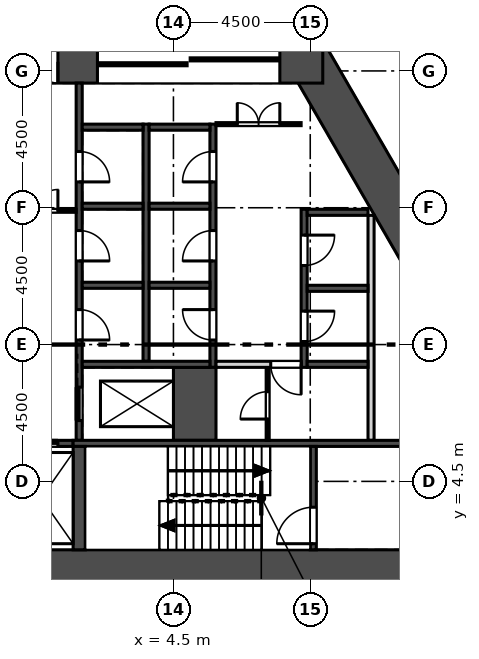
"""IFC4 building model, lengths in metres.
Left out: names, types, materials, properties, quantities, classifications, styles, units other than length and angle.
Written with IfcOpenShell. Run it as: python <this file> out.ifc"""

import sys

from ifc_helpers import new_model, si_unit, direction, frame, frame_2d, origin, place, context, subcontext, project, spatial, rectangle, extrude, element, fill, save


model = new_model("IFC4")
c1 = context("Model", 3, precision=1e-05, world=origin(), true_north=direction((0.0, 1.0)))
c2 = subcontext(c1, "Body", "Model", "MODEL_VIEW")
j1 = project(units=[si_unit("LENGTHUNIT", "METRE"), si_unit("PLANEANGLEUNIT", "RADIAN")], contexts=[c1])
p1 = place(None, origin())
s1 = spatial("IfcSite", under=j1, at=p1, CompositionType="ELEMENT")
p2 = place(p1, origin())
s2 = spatial("IfcBuilding", under=s1, at=p2, CompositionType="ELEMENT")
p3 = place(p2, frame((0.0, 0.0, -8.0)))
s3 = spatial("IfcBuildingStorey", under=s2, at=p3, CompositionType="ELEMENT", Elevation=-8.0)
p4 = place(p3, frame((42.971, 8.51, 0.0), z_axis=(0.0, 0.0, 1.0), x_axis=(-0.499999312333, 0.866025800809, 0.0)))
e1 = element("IfcWall", 1, at=p4, inside=s3, PredefinedType="SOLIDWALL", context=c2, shape_type="SweptSolid", body=[
    extrude(rectangle(XDim=76.231, YDim=0.6, at=frame_2d((38.115, 0.0))), origin(), (0.0, 0.0, 1.0), 7.6),
])
p5 = place(p3, frame((-14.0, 1.55, 0.0), z_axis=(0.0, 0.0, 1.0), x_axis=(1.0, 0.0, 0.0)))
e2 = element("IfcWall", 2, at=p5, inside=s3, PredefinedType="SHEAR", context=c2, shape_type="SweptSolid", body=[
    extrude(rectangle(XDim=28.0, YDim=1.4, at=frame_2d((14.0, 0.0))), origin(), (0.0, 0.0, 1.0), 8.0),
])
p6 = place(p3, frame((13.394, 10.703, 0.0), z_axis=(0.0, 0.0, 1.0), x_axis=(-0.50000187635, 0.866024320471, 0.0)))
e3 = element("IfcWall", 3, at=p6, inside=s3, PredefinedType="SHEAR", context=c2, shape_type="SweptSolid", body=[
    extrude(rectangle(XDim=9.177, YDim=1.4, at=frame_2d((4.588, 0.0))), origin(), (0.0, 0.0, 1.0), 8.0),
])
p7 = place(p3, frame((9.412, 18.3, 0.0), z_axis=(0.0, 0.0, 1.0), x_axis=(-1.0, 0.0, 0.0)))
e4 = element("IfcWall", 4, at=p7, inside=s3, PredefinedType="SHEAR", context=c2, shape_type="SweptSolid", body=[
    extrude(rectangle(XDim=18.823, YDim=1.4, at=frame_2d((9.412, 0.0))), origin(), (0.0, 0.0, 1.0), 8.0),
])
p8 = place(p7, frame((8.711, 0.0, 0.0)))
e5 = element("IfcOpeningElement", 5, at=p8, cuts=e4, PredefinedType="OPENING", context=c2, shape_type="SweptSolid", body=[
    extrude(rectangle(XDim=1.4, YDim=2.1, at=frame_2d((0.7, 1.05))), frame((0.0, 0.71, 0.0), z_axis=(0.0, -1.0, 0.0), x_axis=(1.0, 0.0, 0.0)), (0.0, 0.0, 1.0), 1.42),
])
p9 = place(p7, frame((11.412, 0.0, 0.0)))
e6 = element("IfcOpeningElement", 6, at=p9, cuts=e4, PredefinedType="OPENING", context=c2, shape_type="SweptSolid", body=[
    extrude(rectangle(XDim=6.0, YDim=2.4, at=frame_2d((3.0, 1.2))), frame((0.0, 0.71, 0.0), z_axis=(0.0, -1.0, 0.0), x_axis=(1.0, 0.0, 0.0)), (0.0, 0.0, 1.0), 1.42),
])
p10 = place(p7, frame((1.412, 0.0, 0.0)))
e7 = element("IfcOpeningElement", 7, at=p10, cuts=e4, PredefinedType="OPENING", context=c2, shape_type="SweptSolid", body=[
    extrude(rectangle(XDim=6.0, YDim=2.4, at=frame_2d((3.0, 1.2))), frame((0.0, 0.71, 0.0), z_axis=(0.0, -1.0, 0.0), x_axis=(1.0, 0.0, 0.0)), (0.0, 0.0, 1.0), 1.42),
])
p11 = place(p3, frame((11.0, 5.85, 0.0), z_axis=(0.0, 0.0, 1.0), x_axis=(0.0, 1.0, 0.0)))
e8 = element("IfcWall", 8, at=p11, inside=s3, PredefinedType="SOLIDWALL", context=c2, shape_type="SweptSolid", body=[
    extrude(rectangle(XDim=7.4, YDim=0.2, at=frame_2d((3.7, 0.0))), origin(), (0.0, 0.0, 1.0), 7.6),
])
p12 = place(p3, frame((8.8, 8.25, -0.35), z_axis=(0.0, 0.0, 1.0), x_axis=(0.0, 1.0, 0.0)))
e9 = element("IfcWall", 9, at=p12, inside=s3, PredefinedType="SOLIDWALL", context=c2, shape_type="SweptSolid", body=[
    extrude(rectangle(XDim=5.2, YDim=0.2, at=frame_2d((2.6, 0.0))), origin(), (0.0, 0.0, 1.0), 7.95),
])
p13 = place(p12, frame((0.85, 0.0, 0.35)))
e10 = element("IfcOpeningElement", 10, at=p13, cuts=e9, PredefinedType="OPENING", context=c2, shape_type="SweptSolid", body=[
    extrude(rectangle(XDim=1.0, YDim=2.1, at=frame_2d((0.5, 1.05))), frame((0.0, 0.11, 0.0), z_axis=(0.0, -1.0, 0.0), x_axis=(1.0, 0.0, 0.0)), (0.0, 0.0, 1.0), 0.22),
])
p14 = place(p12, frame((3.35, 0.0, 0.35)))
e11 = element("IfcOpeningElement", 11, at=p14, cuts=e9, PredefinedType="OPENING", context=c2, shape_type="SweptSolid", body=[
    extrude(rectangle(XDim=1.0, YDim=2.1, at=frame_2d((0.5, 1.05))), frame((0.0, 0.11, 0.0), z_axis=(0.0, -1.0, 0.0), x_axis=(1.0, 0.0, 0.0)), (0.0, 0.0, 1.0), 0.22),
])
p15 = place(p3, frame((5.8, 8.25, -0.35), z_axis=(0.0, 0.0, 1.0), x_axis=(0.0, 1.0, 0.0)))
e12 = element("IfcWall", 12, at=p15, inside=s3, PredefinedType="SOLIDWALL", context=c2, shape_type="SweptSolid", body=[
    extrude(rectangle(XDim=8.0, YDim=0.2, at=frame_2d((4.0, 0.0))), origin(), (0.0, 0.0, 1.0), 7.95),
])
p16 = place(p15, frame((0.9, 0.0, 0.35)))
e13 = element("IfcOpeningElement", 13, at=p16, cuts=e12, PredefinedType="OPENING", context=c2, shape_type="SweptSolid", body=[
    extrude(rectangle(XDim=1.0, YDim=2.1, at=frame_2d((0.5, 1.05))), frame((0.0, 0.11, 0.0), z_axis=(0.0, -1.0, 0.0), x_axis=(1.0, 0.0, 0.0)), (0.0, 0.0, 1.0), 0.22),
])
p17 = place(p15, frame((3.5, 0.0, 0.35)))
e14 = element("IfcOpeningElement", 14, at=p17, cuts=e12, PredefinedType="OPENING", context=c2, shape_type="SweptSolid", body=[
    extrude(rectangle(XDim=1.0, YDim=2.1, at=frame_2d((0.5, 1.05))), frame((0.0, 0.11, 0.0), z_axis=(0.0, -1.0, 0.0), x_axis=(1.0, 0.0, 0.0)), (0.0, 0.0, 1.0), 0.22),
])
p18 = place(p15, frame((6.1, 0.0, 0.35)))
e15 = element("IfcOpeningElement", 15, at=p18, cuts=e12, PredefinedType="OPENING", context=c2, shape_type="SweptSolid", body=[
    extrude(rectangle(XDim=1.0, YDim=2.1, at=frame_2d((0.5, 1.05))), frame((0.0, 0.11, 0.0), z_axis=(0.0, -1.0, 0.0), x_axis=(1.0, 0.0, 0.0)), (0.0, 0.0, 1.0), 0.22),
])
p19 = place(p3, frame((3.6, 8.45, -0.35), z_axis=(0.0, 0.0, 1.0), x_axis=(0.0, 1.0, 0.0)))
e16 = element("IfcWall", 16, at=p19, inside=s3, PredefinedType="SOLIDWALL", context=c2, shape_type="SweptSolid", body=[
    extrude(rectangle(XDim=7.8, YDim=0.2, at=frame_2d((3.9, 0.0))), origin(), (0.0, 0.0, 1.0), 7.95),
])
p20 = place(p3, frame((1.4, 5.85, -0.35), z_axis=(0.0, 0.0, 1.0), x_axis=(0.0, 1.0, 0.0)))
e17 = element("IfcWall", 17, at=p20, inside=s3, PredefinedType="SOLIDWALL", context=c2, shape_type="SweptSolid", body=[
    extrude(rectangle(XDim=11.75, YDim=0.2, at=frame_2d((5.875, 0.0))), origin(), (0.0, 0.0, 1.0), 7.95),
])
p21 = place(p20, frame((0.65, 0.0, 0.35)))
e18 = element("IfcOpeningElement", 18, at=p21, cuts=e17, PredefinedType="OPENING", context=c2, shape_type="SweptSolid", body=[
    extrude(rectangle(XDim=1.1, YDim=2.1, at=frame_2d((0.55, 1.05))), frame((0.0, 0.11, 0.0), z_axis=(0.0, -1.0, 0.0), x_axis=(1.0, 0.0, 0.0)), (0.0, 0.0, 1.0), 0.22),
])
p22 = place(p20, frame((3.3, 0.0, 0.35)))
e19 = element("IfcOpeningElement", 19, at=p22, cuts=e17, PredefinedType="OPENING", context=c2, shape_type="SweptSolid", body=[
    extrude(rectangle(XDim=1.0, YDim=2.1, at=frame_2d((0.5, 1.05))), frame((0.0, 0.11, 0.0), z_axis=(0.0, -1.0, 0.0), x_axis=(1.0, 0.0, 0.0)), (0.0, 0.0, 1.0), 0.22),
])
p23 = place(p20, frame((5.9, 0.0, 0.35)))
e20 = element("IfcOpeningElement", 20, at=p23, cuts=e17, PredefinedType="OPENING", context=c2, shape_type="SweptSolid", body=[
    extrude(rectangle(XDim=1.0, YDim=2.1, at=frame_2d((0.5, 1.05))), frame((0.0, 0.11, 0.0), z_axis=(0.0, -1.0, 0.0), x_axis=(1.0, 0.0, 0.0)), (0.0, 0.0, 1.0), 0.22),
])
p24 = place(p20, frame((8.5, 0.0, 0.35)))
e21 = element("IfcOpeningElement", 21, at=p24, cuts=e17, PredefinedType="OPENING", context=c2, shape_type="SweptSolid", body=[
    extrude(rectangle(XDim=1.0, YDim=2.1, at=frame_2d((0.5, 1.05))), frame((0.0, 0.11, 0.0), z_axis=(0.0, -1.0, 0.0), x_axis=(1.0, 0.0, 0.0)), (0.0, 0.0, 1.0), 0.22),
])
p25 = place(p3, frame((5.2, 5.85, -0.35), z_axis=(0.0, 0.0, 1.0), x_axis=(0.0, 1.0, 0.0)))
e22 = element("IfcWall", 22, at=p25, inside=s3, PredefinedType="SOLIDWALL", context=c2, shape_type="SweptSolid", body=[
    extrude(rectangle(XDim=2.4, YDim=1.4, at=frame_2d((1.2, 0.0))), origin(), (0.0, 0.0, 1.0), 7.95),
])
p26 = place(p3, frame((8.9, 8.35, -0.35), z_axis=(0.0, 0.0, 1.0), x_axis=(1.0, 0.0, 0.0)))
e23 = element("IfcWall", 23, at=p26, inside=s3, PredefinedType="SOLIDWALL", context=c2, shape_type="SweptSolid", body=[
    extrude(rectangle(XDim=2.0, YDim=0.2, at=frame_2d((1.0, 0.0))), origin(), (0.0, 0.0, 1.0), 7.95),
])
p27 = place(p3, frame((1.5, 8.35, -0.35), z_axis=(0.0, 0.0, 1.0), x_axis=(1.0, 0.0, 0.0)))
e24 = element("IfcWall", 24, at=p27, inside=s3, PredefinedType="SOLIDWALL", context=c2, shape_type="SweptSolid", body=[
    extrude(rectangle(XDim=4.2, YDim=0.2, at=frame_2d((2.1, 0.0))), origin(), (0.0, 0.0, 1.0), 7.95),
])
p28 = place(p3, frame((-1.2, 5.75, -0.35), z_axis=(0.0, 0.0, 1.0), x_axis=(1.0, 0.0, 0.0)))
e25 = element("IfcWall", 25, at=p28, inside=s3, PredefinedType="SOLIDWALL", context=c2, shape_type="SweptSolid", body=[
    extrude(rectangle(XDim=2.4, YDim=0.2, at=frame_2d((1.2, 0.0))), origin(), (0.0, 0.0, 1.0), 7.95),
])
p29 = place(p28, frame((0.5, 0.0, 0.35)))
e26 = element("IfcOpeningElement", 26, at=p29, cuts=e25, PredefinedType="OPENING", context=c2, shape_type="SweptSolid", body=[
    extrude(rectangle(XDim=1.4, YDim=2.1, at=frame_2d((0.7, 1.05))), frame((0.0, 0.11, 0.0), z_axis=(0.0, -1.0, 0.0), x_axis=(1.0, 0.0, 0.0)), (0.0, 0.0, 1.0), 0.22),
])
p30 = place(p3, frame((1.2, 5.75, -0.35), z_axis=(0.0, 0.0, 1.0), x_axis=(1.0, 0.0, 0.0)))
e27 = element("IfcWall", 27, at=p30, inside=s3, PredefinedType="SOLIDWALL", context=c2, shape_type="SweptSolid", body=[
    extrude(rectangle(XDim=11.4, YDim=0.2, at=frame_2d((5.7, 0.0))), origin(), (0.0, 0.0, 1.0), 7.95),
])
p31 = place(p3, frame((9.1, 2.25, -0.35), z_axis=(0.0, 0.0, 1.0), x_axis=(0.0, 1.0, 0.0)))
e28 = element("IfcWall", 28, at=p31, inside=s3, PredefinedType="SOLIDWALL", context=c2, shape_type="SweptSolid", body=[
    extrude(rectangle(XDim=3.4, YDim=0.2, at=frame_2d((1.7, 0.0))), origin(), (0.0, 0.0, 1.0), 7.95),
])
p32 = place(p31, frame((0.2, 0.0, 0.35)))
e29 = element("IfcOpeningElement", 29, at=p32, cuts=e28, PredefinedType="OPENING", context=c2, shape_type="SweptSolid", body=[
    extrude(rectangle(XDim=1.2, YDim=2.1, at=frame_2d((0.6, 1.05))), frame((0.0, 0.11, 0.0), z_axis=(0.0, -1.0, 0.0), x_axis=(1.0, 0.0, 0.0)), (0.0, 0.0, 1.0), 0.22),
])
p33 = place(p3, frame((1.4, 2.25, -0.35), z_axis=(0.0, 0.0, 1.0), x_axis=(0.0, 1.0, 0.0)))
e30 = element("IfcWall", 30, at=p33, inside=s3, PredefinedType="SOLIDWALL", context=c2, shape_type="SweptSolid", body=[
    extrude(rectangle(XDim=3.4, YDim=0.4, at=frame_2d((1.7, 0.0))), origin(), (0.0, 0.0, 1.0), 7.95),
])
for number, where, z_axis, x_axis in (
    (31, (8.9, 10.85, -0.35), (0.0, 0.0, 1.0), (1.0, 0.0, 0.0)),
    (32, (8.9, 13.35, -0.35), (0.0, 0.0, 1.0), (1.0, 0.0, 0.0)),
    (33, (3.7, 10.95, -0.35), (0.0, 0.0, 1.0), (1.0, 0.0, 0.0)),
    (34, (3.7, 13.55, -0.35), (0.0, 0.0, 1.0), (1.0, 0.0, 0.0)),
    (35, (3.7, 16.15, -0.35), (0.0, 0.0, 1.0), (1.0, 0.0, 0.0)),
    (36, (1.5, 10.95, -0.35), (0.0, 0.0, 1.0), (1.0, 0.0, 0.0)),
    (37, (1.5, 13.55, -0.35), (0.0, 0.0, 1.0), (1.0, 0.0, 0.0)),
    (38, (1.5, 16.15, -0.35), (0.0, 0.0, 1.0), (1.0, 0.0, 0.0)),
):
    element("IfcWall", number, at=place(p3, frame(where, z_axis=z_axis, x_axis=x_axis)), inside=s3, PredefinedType="SOLIDWALL", context=c2, shape_type="SweptSolid", body=[
        extrude(rectangle(XDim=2.0, YDim=0.2, at=frame_2d((1.0, 0.0))), origin(), (0.0, 0.0, 1.0), 7.95),
    ])
p34 = place(p3, frame((5.9, 16.25, 0.0), z_axis=(0.0, 0.0, 1.0), x_axis=(1.0, 0.0, 0.0)))
e39 = element("IfcWall", 39, at=p34, inside=s3, PredefinedType="PARTITIONING", context=c2, shape_type="SweptSolid", body=[
    extrude(rectangle(XDim=2.8, YDim=0.1, at=frame_2d((1.4, 0.0))), origin(), (0.0, 0.0, 1.0), 7.6),
])
p35 = place(p34, frame((0.7, 0.0, 0.0)))
e40 = element("IfcOpeningElement", 40, at=p35, cuts=e39, PredefinedType="OPENING", context=c2, shape_type="SweptSolid", body=[
    extrude(rectangle(XDim=1.4, YDim=2.1, at=frame_2d((0.7, 1.05))), frame((0.0, 0.06, 0.0), z_axis=(0.0, -1.0, 0.0), x_axis=(1.0, 0.0, 0.0)), (0.0, 0.0, 1.0), 0.12),
])
p36 = place(p3, frame((7.6, 5.85, 0.0), z_axis=(0.0, 0.0, 1.0), x_axis=(0.0, 1.0, 0.0)))
e41 = element("IfcWall", 41, at=p36, inside=s3, PredefinedType="PARTITIONING", context=c2, shape_type="SweptSolid", body=[
    extrude(rectangle(XDim=2.4, YDim=0.1, at=frame_2d((1.2, 0.0))), origin(), (0.0, 0.0, 1.0), 7.6),
])
p37 = place(p36, frame((0.7, 0.0, 0.0)))
e42 = element("IfcOpeningElement", 42, at=p37, cuts=e41, PredefinedType="OPENING", context=c2, shape_type="SweptSolid", body=[
    extrude(rectangle(XDim=0.9, YDim=2.1, at=frame_2d((0.45, 1.05))), frame((0.0, 0.06, 0.0), z_axis=(0.0, -1.0, 0.0), x_axis=(1.0, 0.0, 0.0)), (0.0, 0.0, 1.0), 0.12),
])
p38 = place(p3, frame((5.9, 8.35, 0.0), z_axis=(0.0, 0.0, 1.0), x_axis=(1.0, 0.0, 0.0)))
e43 = element("IfcWall", 43, at=p38, inside=s3, PredefinedType="SOLIDWALL", context=c2, shape_type="SweptSolid", body=[
    extrude(rectangle(XDim=2.8, YDim=0.2, at=frame_2d((1.4, 0.0))), origin(), (0.0, 0.0, 1.0), 7.6),
])
p39 = place(p38, frame((1.8, 0.0, 0.0)))
e44 = element("IfcOpeningElement", 44, at=p39, cuts=e43, PredefinedType="OPENING", context=c2, shape_type="SweptSolid", body=[
    extrude(rectangle(XDim=1.0, YDim=2.1, at=frame_2d((0.5, 1.05))), frame((0.0, 0.11, 0.0), z_axis=(0.0, -1.0, 0.0), x_axis=(1.0, 0.0, 0.0)), (0.0, 0.0, 1.0), 0.22),
])
p40 = place(p3, frame((-1.3, 13.4, 0.0), z_axis=(0.0, 0.0, 1.0), x_axis=(1.0, 0.0, 0.0)))
e45 = element("IfcWall", 45, at=p40, inside=s3, PredefinedType="PARTITIONING", context=c2, shape_type="SweptSolid", body=[
    extrude(rectangle(XDim=2.6, YDim=0.1, at=frame_2d((1.3, 0.0))), origin(), (0.0, 0.0, 1.0), 7.6),
])
p41 = place(p40, frame((0.6, 0.0, 0.0)))
e46 = element("IfcOpeningElement", 46, at=p41, cuts=e45, PredefinedType="OPENING", context=c2, shape_type="SweptSolid", body=[
    extrude(rectangle(XDim=1.4, YDim=2.1, at=frame_2d((0.7, 1.05))), frame((0.0, 0.06, 0.0), z_axis=(0.0, -1.0, 0.0), x_axis=(1.0, 0.0, 0.0)), (0.0, 0.0, 1.0), 0.12),
])
p42 = place(p21, origin())
e47 = element("IfcDoor", 47, at=p42, inside=s3, OperationType="SLIDING_TO_RIGHT", PredefinedType="DOOR", context=c2, shape_type="SweptSolid", body=[
    extrude(rectangle(XDim=1.1, YDim=2.1, at=frame_2d((0.55, 1.05))), frame((0.0, 0.025, 0.0), z_axis=(0.0, -1.0, 0.0), x_axis=(1.0, 0.0, 0.0)), (0.0, 0.0, 1.0), 0.05),
])
fill(e18, e47)
p43 = place(p29, origin())
e48 = element("IfcDoor", 48, at=p43, inside=s3, OperationType="SLIDING_TO_LEFT", PredefinedType="DOOR", context=c2, shape_type="SweptSolid", body=[
    extrude(rectangle(XDim=1.4, YDim=2.1, at=frame_2d((0.7, 1.05))), frame((0.0, 0.025, 0.0), z_axis=(0.0, -1.0, 0.0), x_axis=(1.0, 0.0, 0.0)), (0.0, 0.0, 1.0), 0.05),
])
fill(e26, e48)
p44 = place(p13, frame((1.0, 0.0, 0.0), z_axis=(0.0, 0.0, 1.0), x_axis=(-1.0, 0.0, 0.0)))
e49 = element("IfcDoor", 49, at=p44, inside=s3, OperationType="SINGLE_SWING_LEFT", PredefinedType="DOOR", context=c2, shape_type="SweptSolid", body=[
    extrude(rectangle(XDim=1.0, YDim=2.1, at=frame_2d((0.5, 1.05))), frame((0.0, 0.025, 0.0), z_axis=(0.0, -1.0, 0.0), x_axis=(1.0, 0.0, 0.0)), (0.0, 0.0, 1.0), 0.05),
])
fill(e10, e49)
p45 = place(p14, frame((1.0, 0.0, 0.0), z_axis=(0.0, 0.0, 1.0), x_axis=(-1.0, 0.0, 0.0)))
e50 = element("IfcDoor", 50, at=p45, inside=s3, OperationType="SINGLE_SWING_LEFT", PredefinedType="DOOR", context=c2, shape_type="SweptSolid", body=[
    extrude(rectangle(XDim=1.0, YDim=2.1, at=frame_2d((0.5, 1.05))), frame((0.0, 0.025, 0.0), z_axis=(0.0, -1.0, 0.0), x_axis=(1.0, 0.0, 0.0)), (0.0, 0.0, 1.0), 0.05),
])
fill(e11, e50)
p46 = place(p16, origin())
e51 = element("IfcDoor", 51, at=p46, inside=s3, OperationType="SINGLE_SWING_RIGHT", PredefinedType="DOOR", context=c2, shape_type="SweptSolid", body=[
    extrude(rectangle(XDim=1.0, YDim=2.1, at=frame_2d((0.5, 1.05))), frame((0.0, 0.025, 0.0), z_axis=(0.0, -1.0, 0.0), x_axis=(1.0, 0.0, 0.0)), (0.0, 0.0, 1.0), 0.05),
])
fill(e13, e51)
p47 = place(p17, origin())
e52 = element("IfcDoor", 52, at=p47, inside=s3, OperationType="SINGLE_SWING_LEFT", PredefinedType="DOOR", context=c2, shape_type="SweptSolid", body=[
    extrude(rectangle(XDim=1.0, YDim=2.1, at=frame_2d((0.5, 1.05))), frame((0.0, 0.025, 0.0), z_axis=(0.0, -1.0, 0.0), x_axis=(1.0, 0.0, 0.0)), (0.0, 0.0, 1.0), 0.05),
])
fill(e14, e52)
p48 = place(p18, origin())
e53 = element("IfcDoor", 53, at=p48, inside=s3, OperationType="SINGLE_SWING_LEFT", PredefinedType="DOOR", context=c2, shape_type="SweptSolid", body=[
    extrude(rectangle(XDim=1.0, YDim=2.1, at=frame_2d((0.5, 1.05))), frame((0.0, 0.025, 0.0), z_axis=(0.0, -1.0, 0.0), x_axis=(1.0, 0.0, 0.0)), (0.0, 0.0, 1.0), 0.05),
])
fill(e15, e53)
p49 = place(p22, frame((1.0, 0.0, 0.0), z_axis=(0.0, 0.0, 1.0), x_axis=(-1.0, 0.0, 0.0)))
e54 = element("IfcDoor", 54, at=p49, inside=s3, OperationType="SINGLE_SWING_RIGHT", PredefinedType="DOOR", context=c2, shape_type="SweptSolid", body=[
    extrude(rectangle(XDim=1.0, YDim=2.1, at=frame_2d((0.5, 1.05))), frame((0.0, 0.025, 0.0), z_axis=(0.0, -1.0, 0.0), x_axis=(1.0, 0.0, 0.0)), (0.0, 0.0, 1.0), 0.05),
])
fill(e19, e54)
p50 = place(p23, frame((1.0, 0.0, 0.0), z_axis=(0.0, 0.0, 1.0), x_axis=(-1.0, 0.0, 0.0)))
e55 = element("IfcDoor", 55, at=p50, inside=s3, OperationType="SINGLE_SWING_RIGHT", PredefinedType="DOOR", context=c2, shape_type="SweptSolid", body=[
    extrude(rectangle(XDim=1.0, YDim=2.1, at=frame_2d((0.5, 1.05))), frame((0.0, 0.025, 0.0), z_axis=(0.0, -1.0, 0.0), x_axis=(1.0, 0.0, 0.0)), (0.0, 0.0, 1.0), 0.05),
])
fill(e20, e55)
p51 = place(p24, frame((1.0, 0.0, 0.0), z_axis=(0.0, 0.0, 1.0), x_axis=(-1.0, 0.0, 0.0)))
e56 = element("IfcDoor", 56, at=p51, inside=s3, OperationType="SINGLE_SWING_RIGHT", PredefinedType="DOOR", context=c2, shape_type="SweptSolid", body=[
    extrude(rectangle(XDim=1.0, YDim=2.1, at=frame_2d((0.5, 1.05))), frame((0.0, 0.025, 0.0), z_axis=(0.0, -1.0, 0.0), x_axis=(1.0, 0.0, 0.0)), (0.0, 0.0, 1.0), 0.05),
])
fill(e21, e56)
p52 = place(p35, origin())
e57 = element("IfcDoor", 57, at=p52, inside=s3, OperationType="DOUBLE_DOOR_SINGLE_SWING", PredefinedType="DOOR", context=c2, shape_type="SweptSolid", body=[
    extrude(rectangle(XDim=1.4, YDim=2.1, at=frame_2d((0.7, 1.05))), frame((0.0, 0.025, 0.0), z_axis=(0.0, -1.0, 0.0), x_axis=(1.0, 0.0, 0.0)), (0.0, 0.0, 1.0), 0.05),
])
fill(e40, e57)
p53 = place(p39, frame((1.0, 0.0, 0.0), z_axis=(0.0, 0.0, 1.0), x_axis=(-1.0, 0.0, 0.0)))
e58 = element("IfcDoor", 58, at=p53, inside=s3, OperationType="SINGLE_SWING_LEFT", PredefinedType="DOOR", context=c2, shape_type="SweptSolid", body=[
    extrude(rectangle(XDim=1.0, YDim=2.1, at=frame_2d((0.5, 1.05))), frame((0.0, 0.025, 0.0), z_axis=(0.0, -1.0, 0.0), x_axis=(1.0, 0.0, 0.0)), (0.0, 0.0, 1.0), 0.05),
])
fill(e44, e58)
p54 = place(p37, origin())
e59 = element("IfcDoor", 59, at=p54, inside=s3, OperationType="SINGLE_SWING_LEFT", PredefinedType="DOOR", context=c2, shape_type="SweptSolid", body=[
    extrude(rectangle(XDim=0.9, YDim=2.1, at=frame_2d((0.45, 1.05))), frame((0.0, 0.025, 0.0), z_axis=(0.0, -1.0, 0.0), x_axis=(1.0, 0.0, 0.0)), (0.0, 0.0, 1.0), 0.05),
])
fill(e42, e59)
p55 = place(p32, origin())
e60 = element("IfcDoor", 60, at=p55, inside=s3, OperationType="SINGLE_SWING_LEFT", PredefinedType="DOOR", context=c2, shape_type="SweptSolid", body=[
    extrude(rectangle(XDim=1.2, YDim=2.1, at=frame_2d((0.6, 1.05))), frame((0.0, 0.025, 0.0), z_axis=(0.0, -1.0, 0.0), x_axis=(1.0, 0.0, 0.0)), (0.0, 0.0, 1.0), 0.05),
])
fill(e29, e60)
p56 = place(p41, origin())
e61 = element("IfcDoor", 61, at=p56, inside=s3, OperationType="DOUBLE_DOOR_SINGLE_SWING", PredefinedType="DOOR", context=c2, shape_type="SweptSolid", body=[
    extrude(rectangle(XDim=1.4, YDim=2.1, at=frame_2d((0.7, 1.05))), frame((0.0, 0.025, 0.0), z_axis=(0.0, -1.0, 0.0), x_axis=(1.0, 0.0, 0.0)), (0.0, 0.0, 1.0), 0.05),
])
fill(e46, e61)
p57 = place(p8, origin())
e62 = element("IfcDoor", 62, at=p57, inside=s3, OperationType="DOUBLE_DOOR_SINGLE_SWING", PredefinedType="DOOR", context=c2, shape_type="SweptSolid", body=[
    extrude(rectangle(XDim=1.4, YDim=2.1, at=frame_2d((0.7, 1.05))), frame((0.0, 0.025, 0.0), z_axis=(0.0, -1.0, 0.0), x_axis=(1.0, 0.0, 0.0)), (0.0, 0.0, 1.0), 0.05),
])
fill(e5, e62)
p58 = place(p10, origin())
e63 = element("IfcDoor", 63, at=p58, inside=s3, OperationType="DOUBLE_DOOR_SLIDING", PredefinedType="DOOR", context=c2, shape_type="SweptSolid", body=[
    extrude(rectangle(XDim=6.0, YDim=2.4, at=frame_2d((3.0, 1.2))), frame((0.0, 0.025, 0.0), z_axis=(0.0, -1.0, 0.0), x_axis=(1.0, 0.0, 0.0)), (0.0, 0.0, 1.0), 0.05),
])
fill(e7, e63)
save(model, sys.argv[1])
